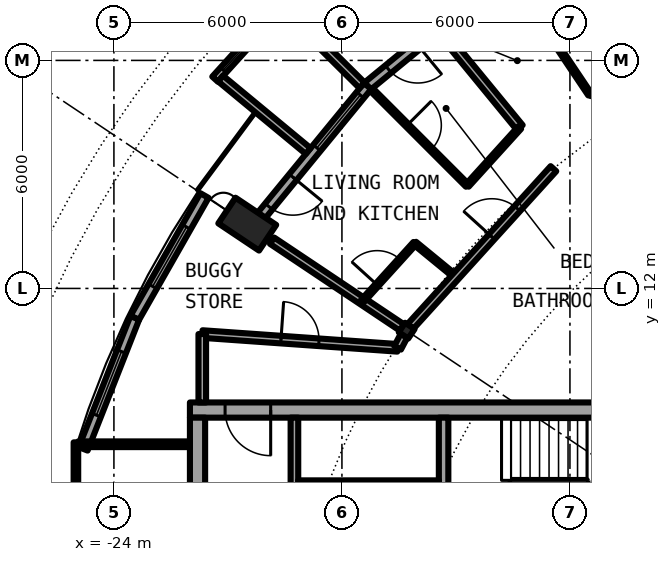
"""IFC4 building model, lengths in metres.
Left out: names, types, materials, properties, quantities, classifications, styles, units other than length and angle.
Written with IfcOpenShell. Run it as: python <this file> out.ifc"""

import sys

from ifc_helpers import new_model, si_unit, direction, frame, frame_2d, origin, origin_2d, place, context, subcontext, project, spatial, rectangle, circle, hollow_circle, i_section, extrude, element, fill, save


model = new_model("IFC4")
c1 = context("Model", 3, precision=1e-05, world=origin(), true_north=direction((0.0, 1.0)))
c2 = subcontext(c1, "Body", "Model", "MODEL_VIEW")
j1 = project(units=[si_unit("LENGTHUNIT", "METRE"), si_unit("PLANEANGLEUNIT", "RADIAN")], contexts=[c1])
p1 = place(None, origin())
s1 = spatial("IfcSite", under=j1, at=p1, CompositionType="ELEMENT")
p2 = place(p1, origin())
s2 = spatial("IfcBuilding", under=s1, at=p2, CompositionType="ELEMENT")
p3 = place(p2, frame((0.0, 0.0, 243.2)))
s3 = spatial("IfcBuildingStorey", under=s2, at=p3, CompositionType="ELEMENT", Elevation=243.2)
p4 = place(p3, frame((-21.027, 14.05, 0.242), z_axis=(0.346875102267, -0.231750495433, 0.908828570905), x_axis=(0.555530396269, 0.831496228988, 0.0)))
e1 = element("IfcColumn", 1, at=p4, inside=s3, PredefinedType="COLUMN", context=c2, shape_type="SweptSolid", body=[
    extrude(hollow_circle(Radius=0.406, WallThickness=0.03, at=origin_2d()), origin(), (0.0, 0.0, 1.0), 3.09),
])
p5 = place(p3, frame((-16.297, 10.889, 0.0), z_axis=(0.0, 0.0, 1.0), x_axis=(-0.831469612303, 0.55557023302, 0.0)))
e2 = element("IfcColumn", 2, at=p5, inside=s3, PredefinedType="COLUMN", context=c2, shape_type="SweptSolid", body=[
    extrude(i_section(OverallWidth=0.3, OverallDepth=0.3, WebThickness=0.011, FlangeThickness=0.019, FilletRadius=0.027, at=origin_2d()), origin(), (0.0, 0.0, 1.0), 3.05),
])
p6 = place(p3, frame((-13.611, 20.371, 0.0), z_axis=(0.0, 0.0, 1.0), x_axis=(-0.773007538262, -0.634396836208, 0.0)))
e3 = element("IfcWall", 3, at=p6, inside=s3, PredefinedType="SOLIDWALL", context=c2, shape_type="SweptSolid", body=[
    extrude(rectangle(XDim=4.803, YDim=0.25, at=frame_2d((2.402, 0.0))), origin(), (0.0, 0.0, 1.0), 2.7),
])
p7 = place(p6, frame((0.62, 0.0, 0.3)))
e4 = element("IfcOpeningElement", 4, at=p7, cuts=e3, PredefinedType="OPENING", context=c2, shape_type="SweptSolid", body=[
    extrude(rectangle(XDim=1.5, YDim=2.1, at=frame_2d((0.75, 1.05))), frame((0.0, 0.135, 0.0), z_axis=(0.0, -1.0, 0.0), x_axis=(1.0, 0.0, 0.0)), (0.0, 0.0, 1.0), 0.27),
])
p8 = place(p6, frame((3.099, 0.0, 0.0)))
e5 = element("IfcOpeningElement", 5, at=p8, cuts=e3, PredefinedType="OPENING", context=c2, shape_type="SweptSolid", body=[
    extrude(rectangle(XDim=1.0, YDim=2.2, at=frame_2d((0.5, 1.1))), frame((0.0, 0.135, 0.0), z_axis=(0.0, -1.0, 0.0), x_axis=(1.0, 0.0, 0.0)), (0.0, 0.0, 1.0), 0.27),
])
p9 = place(p3, frame((-17.324, 17.324, 0.0), z_axis=(0.0, 0.0, 1.0), x_axis=(-0.634396836208, -0.773007538262, 0.0)))
e6 = element("IfcWall", 6, at=p9, inside=s3, PredefinedType="SOLIDWALL", context=c2, shape_type="SweptSolid", body=[
    extrude(rectangle(XDim=4.803, YDim=0.25, at=frame_2d((2.402, 0.0))), origin(), (0.0, 0.0, 1.0), 2.7),
])
p10 = place(p9, frame((0.304, 0.0, 0.3)))
e7 = element("IfcOpeningElement", 7, at=p10, cuts=e6, PredefinedType="OPENING", context=c2, shape_type="SweptSolid", body=[
    extrude(rectangle(XDim=1.8, YDim=2.1, at=frame_2d((0.9, 1.05))), frame((0.0, 0.135, 0.0), z_axis=(0.0, -1.0, 0.0), x_axis=(1.0, 0.0, 0.0)), (0.0, 0.0, 1.0), 0.27),
])
p11 = place(p9, frame((3.099, 0.0, 0.0)))
e8 = element("IfcOpeningElement", 8, at=p11, cuts=e6, PredefinedType="OPENING", context=c2, shape_type="SweptSolid", body=[
    extrude(rectangle(XDim=1.0, YDim=2.2, at=frame_2d((0.5, 1.1))), frame((0.0, 0.135, 0.0), z_axis=(0.0, -1.0, 0.0), x_axis=(1.0, 0.0, 0.0)), (0.0, 0.0, 1.0), 0.27),
])
p12 = place(p3, frame((-19.513, 19.52, -0.03), z_axis=(0.0, 0.0, 1.0), x_axis=(-0.671487056022, -0.741016284298, 0.0)))
e9 = element("IfcWall", 9, at=p12, inside=s3, PredefinedType="SOLIDWALL", context=c2, shape_type="SweptSolid", body=[
    extrude(rectangle(XDim=2.718, YDim=0.2, at=frame_2d((1.359, 0.0))), origin(), (0.0, 0.0, 1.0), 2.73),
])
p13 = place(p12, frame((0.319, 0.0, 0.33)))
e10 = element("IfcOpeningElement", 10, at=p13, cuts=e9, PredefinedType="OPENING", context=c2, shape_type="SweptSolid", body=[
    extrude(circle(Radius=1.04, at=frame_2d((1.04, 1.04))), frame((0.0, 0.11, 0.0), z_axis=(0.0, -1.0, 0.0), x_axis=(1.0, 0.0, 0.0)), (0.0, 0.0, 1.0), 0.22),
])
p14 = place(p3, frame((-17.47, 17.344, -0.03), z_axis=(0.0, 0.0, 1.0), x_axis=(-0.709896457854, 0.704306055012, 0.0)))
e11 = element("IfcWall", 11, at=p14, inside=s3, PredefinedType="SOLIDWALL", context=c2, shape_type="SweptSolid", body=[
    extrude(rectangle(XDim=2.882, YDim=0.2, at=frame_2d((1.441, 0.0))), origin(), (0.0, 0.0, 1.0), 2.73),
])
p15 = place(p3, frame((-18.888, 15.615, -0.03), z_axis=(0.0, 0.0, 1.0), x_axis=(-0.770489638069, 0.637452521862, 0.0)))
e12 = element("IfcWall", 12, at=p15, inside=s3, PredefinedType="SOLIDWALL", context=c2, shape_type="SweptSolid", body=[
    extrude(rectangle(XDim=2.993, YDim=0.2, at=frame_2d((1.497, 0.0))), origin(), (0.0, 0.0, 1.0), 2.73),
])
p16 = place(p3, frame((-21.618, 14.445, 0.0), z_axis=(0.0, 0.0, 1.0), x_axis=(-0.495031435966, -0.868875064325, 0.0)))
e13 = element("IfcWall", 13, at=p16, inside=s3, PredefinedType="SOLIDWALL", context=c2, shape_type="SweptSolid", body=[
    extrude(rectangle(XDim=3.705, YDim=0.25, at=frame_2d((1.853, 0.0))), origin(), (0.0, 0.0, 1.0), 2.7),
])
p17 = place(p16, frame((0.952, 0.0, 0.3)))
e14 = element("IfcOpeningElement", 14, at=p17, cuts=e13, PredefinedType="OPENING", context=c2, shape_type="SweptSolid", body=[
    extrude(rectangle(XDim=1.8, YDim=2.1, at=frame_2d((0.9, 1.05))), frame((0.0, 0.135, 0.0), z_axis=(0.0, -1.0, 0.0), x_axis=(1.0, 0.0, 0.0)), (0.0, 0.0, 1.0), 0.27),
])
p18 = place(p3, frame((-23.452, 11.226, 0.0), z_axis=(0.0, 0.0, 1.0), x_axis=(-0.366351636034, -0.930476479432, 0.0)))
e15 = element("IfcWall", 15, at=p18, inside=s3, PredefinedType="SOLIDWALL", context=c2, shape_type="SweptSolid", body=[
    extrude(rectangle(XDim=3.705, YDim=0.25, at=frame_2d((1.852, 0.0))), origin(), (0.0, 0.0, 1.0), 2.7),
])
p19 = place(p18, frame((0.952, 0.0, 0.3)))
e16 = element("IfcOpeningElement", 16, at=p19, cuts=e15, PredefinedType="OPENING", context=c2, shape_type="SweptSolid", body=[
    extrude(rectangle(XDim=1.8, YDim=2.1, at=frame_2d((0.9, 1.05))), frame((0.0, 0.135, 0.0), z_axis=(0.0, -1.0, 0.0), x_axis=(1.0, 0.0, 0.0)), (0.0, 0.0, 1.0), 0.27),
])
p20 = place(p3, frame((-8.6, 8.8, 0.0), z_axis=(0.0, 0.0, 1.0), x_axis=(-1.0, 0.0, 0.0)))
e17 = element("IfcWall", 17, at=p20, inside=s3, PredefinedType="SHEAR", context=c2, shape_type="SweptSolid", body=[
    extrude(rectangle(XDim=13.4, YDim=0.4, at=frame_2d((6.7, 0.0))), origin(), (0.0, 0.0, 1.0), 3.05),
])
p21 = place(p20, frame((11.275, 0.0, 0.0)))
e18 = element("IfcOpeningElement", 18, at=p21, cuts=e17, PredefinedType="OPENING", context=c2, shape_type="SweptSolid", body=[
    extrude(rectangle(XDim=1.2, YDim=2.3, at=frame_2d((0.6, 1.15))), frame((0.0, 0.21, 0.0), z_axis=(0.0, -1.0, 0.0), x_axis=(1.0, 0.0, 0.0)), (0.0, 0.0, 1.0), 0.42),
])
p22 = place(p3, frame((-21.8, -8.6, 0.0), z_axis=(0.0, 0.0, 1.0), x_axis=(0.0, 1.0, 0.0)))
e19 = element("IfcWall", 19, at=p22, inside=s3, PredefinedType="SHEAR", context=c2, shape_type="SweptSolid", body=[
    extrude(rectangle(XDim=17.2, YDim=0.4, at=frame_2d((8.6, 0.0))), origin(), (0.0, 0.0, 1.0), 3.05),
])
p23 = place(p22, frame((7.7, 0.0, 0.0)))
e20 = element("IfcOpeningElement", 20, at=p23, cuts=e19, PredefinedType="OPENING", context=c2, shape_type="SweptSolid", body=[
    extrude(rectangle(XDim=1.8, YDim=2.3, at=frame_2d((0.9, 1.15))), frame((0.0, 0.21, 0.0), z_axis=(0.0, -1.0, 0.0), x_axis=(1.0, 0.0, 0.0)), (0.0, 0.0, 1.0), 0.42),
])
p24 = place(p3, frame((-15.325, 8.6, 0.0), z_axis=(0.0, 0.0, 1.0), x_axis=(0.0, -1.0, 0.0)))
e21 = element("IfcWall", 21, at=p24, inside=s3, PredefinedType="SHEAR", context=c2, shape_type="SweptSolid", body=[
    extrude(rectangle(XDim=3.95, YDim=0.25, at=frame_2d((1.975, 0.0))), origin(), (0.0, 0.0, 1.0), 3.05),
])
p25 = place(p24, frame((2.025, 0.0, 0.0)))
e22 = element("IfcOpeningElement", 22, at=p25, cuts=e21, PredefinedType="OPENING", context=c2, shape_type="SweptSolid", body=[
    extrude(rectangle(XDim=1.2, YDim=2.3, at=frame_2d((0.6, 1.15))), frame((0.0, 0.135, 0.0), z_axis=(0.0, -1.0, 0.0), x_axis=(1.0, 0.0, 0.0)), (0.0, 0.0, 1.0), 0.27),
])
p26 = place(p3, frame((-19.25, 8.6, 0.0), z_axis=(0.0, 0.0, 1.0), x_axis=(0.0, -1.0, 0.0)))
e23 = element("IfcWall", 23, at=p26, inside=s3, PredefinedType="SOLIDWALL", context=c2, shape_type="SweptSolid", body=[
    extrude(rectangle(XDim=7.025, YDim=0.2, at=frame_2d((3.513, 0.0))), origin(), (0.0, 0.0, 1.0), 2.7),
])
p27 = place(p26, frame((2.35, 0.0, 0.0)))
e24 = element("IfcOpeningElement", 24, at=p27, cuts=e23, PredefinedType="OPENING", context=c2, shape_type="SweptSolid", body=[
    extrude(rectangle(XDim=1.1, YDim=2.3, at=frame_2d((0.55, 1.15))), frame((0.0, 0.11, 0.0), z_axis=(0.0, -1.0, 0.0), x_axis=(1.0, 0.0, 0.0)), (0.0, 0.0, 1.0), 0.22),
])
p28 = place(p3, frame((-15.45, 6.875, 0.0), z_axis=(0.0, 0.0, 1.0), x_axis=(-1.0, 0.0, 0.0)))
e25 = element("IfcWall", 25, at=p28, inside=s3, PredefinedType="PARTITIONING", context=c2, shape_type="SweptSolid", body=[
    extrude(rectangle(XDim=3.7, YDim=0.15, at=frame_2d((1.85, 0.0))), origin(), (0.0, 0.0, 1.0), 2.7),
])
p29 = place(p28, frame((1.4, 0.0, 0.0)))
e26 = element("IfcOpeningElement", 26, at=p29, cuts=e25, PredefinedType="OPENING", context=c2, shape_type="SweptSolid", body=[
    extrude(rectangle(XDim=0.9, YDim=2.3, at=frame_2d((0.45, 1.15))), frame((0.0, 0.085, 0.0), z_axis=(0.0, -1.0, 0.0), x_axis=(1.0, 0.0, 0.0)), (0.0, 0.0, 1.0), 0.17),
])
p30 = place(p3, frame((-22.0, 7.9, 0.0), z_axis=(0.0, 0.0, 1.0), x_axis=(-1.0, 0.0, 0.0)))
e27 = element("IfcWall", 27, at=p30, inside=s3, PredefinedType="PARTITIONING", context=c2, shape_type="SweptSolid", body=[
    extrude(rectangle(XDim=2.94, YDim=0.15, at=frame_2d((1.47, 0.0))), origin(), (0.0, 0.0, 1.0), 2.7),
])
p31 = place(p3, frame((-25.0, 7.95, 0.0), z_axis=(0.0, 0.0, 1.0), x_axis=(0.0, -1.0, 0.0)))
e28 = element("IfcWall", 28, at=p31, inside=s3, PredefinedType="PARTITIONING", context=c2, shape_type="SweptSolid", body=[
    extrude(rectangle(XDim=15.9, YDim=0.12, at=frame_2d((7.95, 0.0))), origin(), (0.0, 0.0, 1.0), 2.7),
])
p32 = place(p31, frame((0.95, 0.0, 0.1)))
e29 = element("IfcOpeningElement", 29, at=p32, cuts=e28, PredefinedType="OPENING", context=c2, shape_type="SweptSolid", body=[
    extrude(rectangle(XDim=14.0, YDim=2.35, at=frame_2d((7.0, 1.175))), frame((0.0, 0.07, 0.0), z_axis=(0.0, -1.0, 0.0), x_axis=(1.0, 0.0, 0.0)), (0.0, 0.0, 1.0), 0.14),
])
p33 = place(p3, frame((-19.838, 13.256, 0.0), z_axis=(0.0, 0.0, 1.0), x_axis=(0.831263363926, -0.555878781566, 0.0)))
e30 = element("IfcWall", 30, at=p33, inside=s3, PredefinedType="PARTITIONING", context=c2, shape_type="SweptSolid", body=[
    extrude(rectangle(XDim=4.109, YDim=0.2, at=frame_2d((2.055, 0.0))), origin(), (0.0, 0.0, 1.0), 2.7),
])
p34 = place(p3, frame((-17.23, 17.241, 0.0), z_axis=(0.0, 0.0, 1.0), x_axis=(0.706833687935, -0.707379769007, 0.0)))
e31 = element("IfcWall", 31, at=p34, inside=s3, PredefinedType="PARTITIONING", context=c2, shape_type="SweptSolid", body=[
    extrude(rectangle(XDim=3.577, YDim=0.1, at=frame_2d((1.788, 0.0))), origin(), (0.0, 0.0, 1.0), 2.7),
])
p35 = place(p34, frame((1.338, 0.0, 0.0)))
e32 = element("IfcOpeningElement", 32, at=p35, cuts=e31, PredefinedType="OPENING", context=c2, shape_type="SweptSolid", body=[
    extrude(rectangle(XDim=0.9, YDim=2.3, at=frame_2d((0.45, 1.15))), frame((0.0, 0.06, 0.0), z_axis=(0.0, -1.0, 0.0), x_axis=(1.0, 0.0, 0.0)), (0.0, 0.0, 1.0), 0.12),
])
p36 = place(p3, frame((-16.081, 13.189, 0.0), z_axis=(0.0, 0.0, 1.0), x_axis=(0.773321325714, -0.634014295735, 0.0)))
e33 = element("IfcWall", 33, at=p36, inside=s3, PredefinedType="PARTITIONING", context=c2, shape_type="SweptSolid", body=[
    extrude(rectangle(XDim=1.386, YDim=0.1, at=frame_2d((0.693, 0.0))), origin(), (0.0, 0.0, 1.0), 2.7),
])
p37 = place(p3, frame((-15.462, 18.843, 0.0), z_axis=(0.0, 0.0, 1.0), x_axis=(0.63432437119, -0.773067003638, 0.0)))
e34 = element("IfcWall", 34, at=p37, inside=s3, PredefinedType="PARTITIONING", context=c2, shape_type="SweptSolid", body=[
    extrude(rectangle(XDim=3.375, YDim=0.2, at=frame_2d((1.688, 0.0))), origin(), (0.0, 0.0, 1.0), 2.7),
])
p38 = place(p3, frame((-13.294, 19.813, 0.0), z_axis=(0.0, 0.0, 1.0), x_axis=(0.557289656456, -0.830318155171, 0.0)))
e35 = element("IfcWall", 35, at=p38, inside=s3, PredefinedType="PARTITIONING", context=c2, shape_type="SweptSolid", body=[
    extrude(rectangle(XDim=3.26, YDim=0.1, at=frame_2d((1.63, 0.0))), origin(), (0.0, 0.0, 1.0), 2.7),
])
p39 = place(p38, frame((0.922, 0.0, 0.0)))
e36 = element("IfcOpeningElement", 36, at=p39, cuts=e35, PredefinedType="OPENING", context=c2, shape_type="SweptSolid", body=[
    extrude(rectangle(XDim=0.9, YDim=2.3, at=frame_2d((0.45, 1.15))), frame((0.0, 0.06, 0.0), z_axis=(0.0, -1.0, 0.0), x_axis=(1.0, 0.0, 0.0)), (0.0, 0.0, 1.0), 0.12),
])
p40 = place(p3, frame((-11.511, 21.486, 0.0), z_axis=(0.0, 0.0, 1.0), x_axis=(0.472243548981, -0.88146811085, 0.0)))
e37 = element("IfcWall", 37, at=p40, inside=s3, PredefinedType="PARTITIONING", context=c2, shape_type="SweptSolid", body=[
    extrude(rectangle(XDim=3.979, YDim=0.1, at=frame_2d((1.989, 0.0))), origin(), (0.0, 0.0, 1.0), 2.7),
])
p41 = place(p3, frame((-21.675, 10.8, 0.0), z_axis=(0.0, 0.0, 1.0), x_axis=(0.997515141784, -0.070452408845, 0.0)))
e38 = element("IfcWall", 38, at=p41, inside=s3, PredefinedType="PARTITIONING", context=c2, shape_type="SweptSolid", body=[
    extrude(rectangle(XDim=5.153, YDim=0.2, at=frame_2d((2.576, 0.0))), origin(), (0.0, 0.0, 1.0), 2.7),
])
p42 = place(p41, frame((2.076, 0.0, 0.0)))
e39 = element("IfcOpeningElement", 39, at=p42, cuts=e38, PredefinedType="OPENING", context=c2, shape_type="SweptSolid", body=[
    extrude(rectangle(XDim=1.0, YDim=2.3, at=frame_2d((0.5, 1.15))), frame((0.0, 0.11, 0.0), z_axis=(0.0, -1.0, 0.0), x_axis=(1.0, 0.0, 0.0)), (0.0, 0.0, 1.0), 0.22),
])
p43 = place(p3, frame((-16.195, 11.002, 0.0), z_axis=(0.0, 0.0, 1.0), x_axis=(0.671619657805, 0.740896102871, 0.0)))
e40 = element("IfcWall", 40, at=p43, inside=s3, PredefinedType="PARTITIONING", context=c2, shape_type="SweptSolid", body=[
    extrude(rectangle(XDim=5.6, YDim=0.2, at=frame_2d((2.8, 0.0))), origin(), (0.0, 0.0, 1.0), 2.45),
])
p44 = place(p43, frame((3.183, 0.0, 0.0)))
e41 = element("IfcOpeningElement", 41, at=p44, cuts=e40, PredefinedType="OPENING", context=c2, shape_type="SweptSolid", body=[
    extrude(rectangle(XDim=1.0, YDim=2.3, at=frame_2d((0.5, 1.15))), frame((0.0, 0.11, 0.0), z_axis=(0.0, -1.0, 0.0), x_axis=(1.0, 0.0, 0.0)), (0.0, 0.0, 1.0), 0.22),
])
p45 = place(p3, frame((-16.535, 10.437, 0.0), z_axis=(0.0, 0.0, 1.0), x_axis=(0.465802239822, 0.884888848035, 0.0)))
e42 = element("IfcWall", 42, at=p45, inside=s3, PredefinedType="PARTITIONING", context=c2, shape_type="SweptSolid", body=[
    extrude(rectangle(XDim=0.361, YDim=0.2, at=frame_2d((0.18, 0.0))), origin(), (0.0, 0.0, 1.0), 2.7),
])
p46 = place(p3, frame((-11.477, 17.106, 0.0), z_axis=(0.0, 0.0, 1.0), x_axis=(0.903998300084, 0.427536049292, 0.0)))
e43 = element("IfcWall", 43, at=p46, inside=s3, PredefinedType="PARTITIONING", context=c2, shape_type="SweptSolid", body=[
    extrude(rectangle(XDim=4.082, YDim=0.1, at=frame_2d((2.041, 0.0))), origin(), (0.0, 0.0, 1.0), 2.7),
])
p47 = place(p46, frame((0.573, 0.0, 0.0)))
e44 = element("IfcOpeningElement", 44, at=p47, cuts=e43, PredefinedType="OPENING", context=c2, shape_type="SweptSolid", body=[
    extrude(rectangle(XDim=0.9, YDim=2.3, at=frame_2d((0.45, 1.15))), frame((0.0, 0.06, 0.0), z_axis=(0.0, -1.0, 0.0), x_axis=(1.0, 0.0, 0.0)), (0.0, 0.0, 1.0), 0.12),
])
p48 = place(p3, frame((-17.461, 11.667, 0.0), z_axis=(0.0, 0.0, 1.0), x_axis=(0.671678456097, 0.74084279818, 0.0)))
e45 = element("IfcWall", 45, at=p48, inside=s3, PredefinedType="PARTITIONING", context=c2, shape_type="SweptSolid", body=[
    extrude(rectangle(XDim=2.054, YDim=0.1, at=frame_2d((1.027, 0.0))), origin(), (0.0, 0.0, 1.0), 2.7),
])
p49 = place(p48, frame((0.577, 0.0, 0.0)))
e46 = element("IfcOpeningElement", 46, at=p49, cuts=e45, PredefinedType="OPENING", context=c2, shape_type="SweptSolid", body=[
    extrude(rectangle(XDim=0.9, YDim=2.3, at=frame_2d((0.45, 1.15))), frame((0.0, 0.06, 0.0), z_axis=(0.0, -1.0, 0.0), x_axis=(1.0, 0.0, 0.0)), (0.0, 0.0, 1.0), 0.12),
])
p50 = place(p3, frame((-14.701, 14.711, 0.0), z_axis=(0.0, 0.0, 1.0), x_axis=(0.671678456097, 0.74084279818, 0.0)))
e47 = element("IfcWall", 47, at=p50, inside=s3, PredefinedType="PARTITIONING", context=c2, shape_type="SweptSolid", body=[
    extrude(rectangle(XDim=2.054, YDim=0.1, at=frame_2d((1.027, 0.0))), origin(), (0.0, 0.0, 1.0), 2.7),
])
p51 = place(p3, frame((-21.675, 9.0, 0.0), z_axis=(0.0, 0.0, 1.0), x_axis=(0.0, 1.0, 0.0)))
e48 = element("IfcWall", 48, at=p51, inside=s3, PredefinedType="PARTITIONING", context=c2, shape_type="SweptSolid", body=[
    extrude(rectangle(XDim=1.8, YDim=0.2, at=frame_2d((0.9, 0.0))), origin(), (0.0, 0.0, 1.0), 2.7),
])
p52 = place(p8, origin())
e49 = element("IfcDoor", 49, at=p52, inside=s3, OperationType="SINGLE_SWING_LEFT", PredefinedType="DOOR", context=c2, shape_type="SweptSolid", body=[
    extrude(rectangle(XDim=1.0, YDim=2.2, at=frame_2d((0.5, 1.1))), frame((0.0, 0.025, 0.0), z_axis=(0.0, -1.0, 0.0), x_axis=(1.0, 0.0, 0.0)), (0.0, 0.0, 1.0), 0.05),
])
fill(e5, e49)
p53 = place(p10, origin())
e50 = element("IfcWindow", 50, at=p53, inside=s3, PartitioningType="SINGLE_PANEL", PredefinedType="WINDOW", context=c2, shape_type="SweptSolid", body=[
    extrude(rectangle(XDim=1.8, YDim=2.1, at=frame_2d((0.9, 1.05))), frame((0.0, 0.03, 0.0), z_axis=(0.0, -1.0, 0.0), x_axis=(1.0, 0.0, 0.0)), (0.0, 0.0, 1.0), 0.06),
])
fill(e7, e50)
p54 = place(p13, origin())
e51 = element("IfcWindow", 51, at=p54, inside=s3, PartitioningType="SINGLE_PANEL", PredefinedType="WINDOW", context=c2, shape_type="SweptSolid", body=[
    extrude(circle(Radius=1.04, at=frame_2d((1.04, 1.04))), frame((0.0, 0.03, 0.0), z_axis=(0.0, -1.0, 0.0), x_axis=(1.0, 0.0, 0.0)), (0.0, 0.0, 1.0), 0.06),
])
fill(e10, e51)
p55 = place(p11, origin())
e52 = element("IfcDoor", 52, at=p55, inside=s3, OperationType="SINGLE_SWING_LEFT", PredefinedType="DOOR", context=c2, shape_type="SweptSolid", body=[
    extrude(rectangle(XDim=1.0, YDim=2.2, at=frame_2d((0.5, 1.1))), frame((0.0, 0.025, 0.0), z_axis=(0.0, -1.0, 0.0), x_axis=(1.0, 0.0, 0.0)), (0.0, 0.0, 1.0), 0.05),
])
fill(e8, e52)
p56 = place(p17, origin())
e53 = element("IfcWindow", 53, at=p56, inside=s3, PartitioningType="SINGLE_PANEL", PredefinedType="WINDOW", context=c2, shape_type="SweptSolid", body=[
    extrude(rectangle(XDim=1.8, YDim=2.1, at=frame_2d((0.9, 1.05))), frame((0.0, 0.03, 0.0), z_axis=(0.0, -1.0, 0.0), x_axis=(1.0, 0.0, 0.0)), (0.0, 0.0, 1.0), 0.06),
])
fill(e14, e53)
p57 = place(p19, origin())
e54 = element("IfcWindow", 54, at=p57, inside=s3, PartitioningType="SINGLE_PANEL", PredefinedType="WINDOW", context=c2, shape_type="SweptSolid", body=[
    extrude(rectangle(XDim=1.8, YDim=2.1, at=frame_2d((0.9, 1.05))), frame((0.0, 0.03, 0.0), z_axis=(0.0, -1.0, 0.0), x_axis=(1.0, 0.0, 0.0)), (0.0, 0.0, 1.0), 0.06),
])
fill(e16, e54)
p58 = place(p29, origin())
e55 = element("IfcDoor", 55, at=p58, inside=s3, OperationType="SINGLE_SWING_LEFT", PredefinedType="DOOR", context=c2, shape_type="SweptSolid", body=[
    extrude(rectangle(XDim=0.9, YDim=2.3, at=frame_2d((0.45, 1.15))), frame((0.0, 0.025, 0.0), z_axis=(0.0, -1.0, 0.0), x_axis=(1.0, 0.0, 0.0)), (0.0, 0.0, 1.0), 0.05),
])
fill(e26, e55)
p59 = place(p21, origin())
e56 = element("IfcDoor", 56, at=p59, inside=s3, OperationType="SINGLE_SWING_LEFT", PredefinedType="DOOR", context=c2, shape_type="SweptSolid", body=[
    extrude(rectangle(XDim=1.2, YDim=2.3, at=frame_2d((0.6, 1.15))), frame((0.0, 0.025, 0.0), z_axis=(0.0, -1.0, 0.0), x_axis=(1.0, 0.0, 0.0)), (0.0, 0.0, 1.0), 0.05),
])
fill(e18, e56)
p60 = place(p32, origin())
e57 = element("IfcWindow", 57, at=p60, inside=s3, PartitioningType="SINGLE_PANEL", PredefinedType="WINDOW", context=c2, shape_type="SweptSolid", body=[
    extrude(rectangle(XDim=14.0, YDim=2.35, at=frame_2d((7.0, 1.175))), frame((0.0, 0.03, 0.0), z_axis=(0.0, -1.0, 0.0), x_axis=(1.0, 0.0, 0.0)), (0.0, 0.0, 1.0), 0.06),
])
fill(e29, e57)
p61 = place(p44, origin())
e58 = element("IfcDoor", 58, at=p61, inside=s3, OperationType="SINGLE_SWING_RIGHT", PredefinedType="DOOR", context=c2, shape_type="SweptSolid", body=[
    extrude(rectangle(XDim=1.0, YDim=2.3, at=frame_2d((0.5, 1.15))), frame((0.0, 0.025, 0.0), z_axis=(0.0, -1.0, 0.0), x_axis=(1.0, 0.0, 0.0)), (0.0, 0.0, 1.0), 0.05),
])
fill(e41, e58)
p62 = place(p49, origin())
e59 = element("IfcDoor", 59, at=p62, inside=s3, OperationType="SINGLE_SWING_LEFT", PredefinedType="DOOR", context=c2, shape_type="SweptSolid", body=[
    extrude(rectangle(XDim=0.9, YDim=2.3, at=frame_2d((0.45, 1.15))), frame((0.0, 0.025, 0.0), z_axis=(0.0, -1.0, 0.0), x_axis=(1.0, 0.0, 0.0)), (0.0, 0.0, 1.0), 0.05),
])
fill(e46, e59)
p63 = place(p35, origin())
e60 = element("IfcDoor", 60, at=p63, inside=s3, OperationType="SINGLE_SWING_LEFT", PredefinedType="DOOR", context=c2, shape_type="SweptSolid", body=[
    extrude(rectangle(XDim=0.9, YDim=2.3, at=frame_2d((0.45, 1.15))), frame((0.0, 0.025, 0.0), z_axis=(0.0, -1.0, 0.0), x_axis=(1.0, 0.0, 0.0)), (0.0, 0.0, 1.0), 0.05),
])
fill(e32, e60)
p64 = place(p42, origin())
e61 = element("IfcDoor", 61, at=p64, inside=s3, OperationType="SINGLE_SWING_RIGHT", PredefinedType="DOOR", context=c2, shape_type="SweptSolid", body=[
    extrude(rectangle(XDim=1.0, YDim=2.3, at=frame_2d((0.5, 1.15))), frame((0.0, 0.025, 0.0), z_axis=(0.0, -1.0, 0.0), x_axis=(1.0, 0.0, 0.0)), (0.0, 0.0, 1.0), 0.05),
])
fill(e39, e61)
save(model, sys.argv[1])
